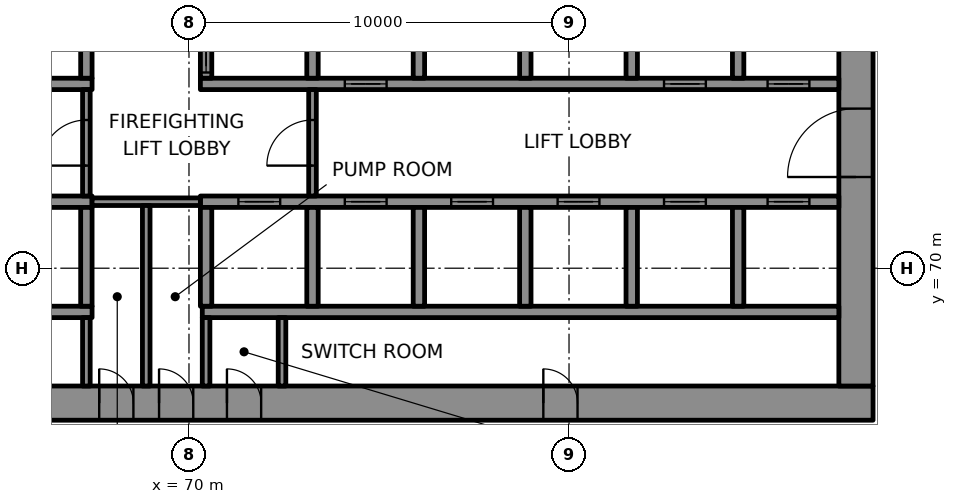
"""IFC4 building model, lengths in metres.
Left out: names, types, materials, properties, quantities, classifications, styles, units other than length and angle.
Written with IfcOpenShell. Run it as: python <this file> out.ifc"""

import sys

from ifc_helpers import new_model, si_unit, direction, frame, frame_2d, origin, place, context, subcontext, project, spatial, rectangle, extrude, element, fill, save


model = new_model("IFC4")
c1 = context("Model", 3, precision=1e-05, world=origin(), true_north=direction((0.0, 1.0)))
c2 = subcontext(c1, "Body", "Model", "MODEL_VIEW")
j1 = project(units=[si_unit("LENGTHUNIT", "METRE"), si_unit("PLANEANGLEUNIT", "RADIAN")], contexts=[c1])
p1 = place(None, origin())
s1 = spatial("IfcSite", under=j1, at=p1, CompositionType="ELEMENT")
p2 = place(p1, origin())
s2 = spatial("IfcBuilding", under=s1, at=p2, CompositionType="ELEMENT")
p3 = place(p2, frame((0.0, 0.0, 115.6)))
s3 = spatial("IfcBuildingStorey", under=s2, at=p3, CompositionType="ELEMENT", Elevation=115.6)
p4 = place(p3, frame((62.0, 66.45, 0.0), z_axis=(0.0, 0.0, 1.0), x_axis=(1.0, 0.0, 0.0)))
e1 = element("IfcWall", 1, at=p4, inside=s3, PredefinedType="SHEAR", context=c2, shape_type="SweptSolid", body=[
    extrude(rectangle(XDim=26.0, YDim=0.9, at=frame_2d((13.0, 0.0))), origin(), (0.0, 0.0, 1.0), 4.0),
])
p5 = place(p4, frame((3.45, 0.0, 0.0)))
e2 = element("IfcOpeningElement", 2, at=p5, cuts=e1, PredefinedType="OPENING", context=c2, shape_type="SweptSolid", body=[
    extrude(rectangle(XDim=0.9, YDim=2.1, at=frame_2d((0.45, 1.05))), frame((0.0, 0.46, 0.0), z_axis=(0.0, -1.0, 0.0), x_axis=(1.0, 0.0, 0.0)), (0.0, 0.0, 1.0), 0.92),
])
p6 = place(p4, frame((5.637, 0.0, 0.0)))
e3 = element("IfcOpeningElement", 3, at=p6, cuts=e1, PredefinedType="OPENING", context=c2, shape_type="SweptSolid", body=[
    extrude(rectangle(XDim=0.9, YDim=2.1, at=frame_2d((0.45, 1.05))), frame((0.0, 0.46, 0.0), z_axis=(0.0, -1.0, 0.0), x_axis=(1.0, 0.0, 0.0)), (0.0, 0.0, 1.0), 0.92),
])
p7 = place(p4, frame((7.212, 0.0, 0.0)))
e4 = element("IfcOpeningElement", 4, at=p7, cuts=e1, PredefinedType="OPENING", context=c2, shape_type="SweptSolid", body=[
    extrude(rectangle(XDim=0.9, YDim=2.1, at=frame_2d((0.45, 1.05))), frame((0.0, 0.46, 0.0), z_axis=(0.0, -1.0, 0.0), x_axis=(1.0, 0.0, 0.0)), (0.0, 0.0, 1.0), 0.92),
])
p8 = place(p4, frame((8.999, 0.0, 0.0)))
e5 = element("IfcOpeningElement", 5, at=p8, cuts=e1, PredefinedType="OPENING", context=c2, shape_type="SweptSolid", body=[
    extrude(rectangle(XDim=0.9, YDim=2.1, at=frame_2d((0.45, 1.05))), frame((0.0, 0.46, 0.0), z_axis=(0.0, -1.0, 0.0), x_axis=(1.0, 0.0, 0.0)), (0.0, 0.0, 1.0), 0.92),
])
p9 = place(p4, frame((17.324, 0.0, 0.0)))
e6 = element("IfcOpeningElement", 6, at=p9, cuts=e1, PredefinedType="OPENING", context=c2, shape_type="SweptSolid", body=[
    extrude(rectangle(XDim=0.9, YDim=2.1, at=frame_2d((0.45, 1.05))), frame((0.0, 0.46, 0.0), z_axis=(0.0, -1.0, 0.0), x_axis=(1.0, 0.0, 0.0)), (0.0, 0.0, 1.0), 0.92),
])
p10 = place(p3, frame((87.55, 66.9, 0.0), z_axis=(0.0, 0.0, 1.0), x_axis=(0.0, 1.0, 0.0)))
e7 = element("IfcWall", 7, at=p10, inside=s3, PredefinedType="SHEAR", context=c2, shape_type="SweptSolid", body=[
    extrude(rectangle(XDim=16.2, YDim=0.9, at=frame_2d((8.1, 0.0))), origin(), (0.0, 0.0, 1.0), 4.0),
])
p11 = place(p10, frame((5.5, 0.0, 0.0)))
e8 = element("IfcOpeningElement", 8, at=p11, cuts=e7, PredefinedType="OPENING", context=c2, shape_type="SweptSolid", body=[
    extrude(rectangle(XDim=1.8, YDim=2.1, at=frame_2d((0.9, 1.05))), frame((0.0, 0.46, 0.0), z_axis=(0.0, -1.0, 0.0), x_axis=(1.0, 0.0, 0.0)), (0.0, 0.0, 1.0), 0.92),
])
p12 = place(p10, frame((11.202, 0.0, 0.0)))
e9 = element("IfcOpeningElement", 9, at=p12, cuts=e7, PredefinedType="OPENING", context=c2, shape_type="SweptSolid", body=[
    extrude(rectangle(XDim=0.9, YDim=2.1, at=frame_2d((0.45, 1.05))), frame((0.0, 0.46, 0.0), z_axis=(0.0, -1.0, 0.0), x_axis=(1.0, 0.0, 0.0)), (0.0, 0.0, 1.0), 0.92),
])
p13 = place(p3, frame((64.35, 68.85, 0.0), z_axis=(0.0, 0.0, 1.0), x_axis=(1.0, 0.0, 0.0)))
e10 = element("IfcWall", 10, at=p13, inside=s3, PredefinedType="SHEAR", context=c2, shape_type="SweptSolid", body=[
    extrude(rectangle(XDim=3.1, YDim=0.3, at=frame_2d((1.55, 0.0))), origin(), (0.0, 0.0, 1.0), 4.0),
])
p14 = place(p3, frame((70.35, 68.85, 0.0), z_axis=(0.0, 0.0, 1.0), x_axis=(1.0, 0.0, 0.0)))
e11 = element("IfcWall", 11, at=p14, inside=s3, PredefinedType="SHEAR", context=c2, shape_type="SweptSolid", body=[
    extrude(rectangle(XDim=16.75, YDim=0.3, at=frame_2d((8.375, 0.0))), origin(), (0.0, 0.0, 1.0), 4.0),
])
p15 = place(p3, frame((64.35, 71.75, 0.0), z_axis=(0.0, 0.0, 1.0), x_axis=(1.0, 0.0, 0.0)))
e12 = element("IfcWall", 12, at=p15, inside=s3, PredefinedType="SHEAR", context=c2, shape_type="SweptSolid", body=[
    extrude(rectangle(XDim=3.1, YDim=0.3, at=frame_2d((1.55, 0.0))), origin(), (0.0, 0.0, 1.0), 4.0),
])
p16 = place(p3, frame((70.3, 71.75, 0.0), z_axis=(0.0, 0.0, 1.0), x_axis=(1.0, 0.0, 0.0)))
e13 = element("IfcWall", 13, at=p16, inside=s3, PredefinedType="SHEAR", context=c2, shape_type="SweptSolid", body=[
    extrude(rectangle(XDim=16.8, YDim=0.3, at=frame_2d((8.4, 0.0))), origin(), (0.0, 0.0, 1.0), 4.0),
])
p17 = place(p16, frame((1.0, 0.0, 0.0)))
e14 = element("IfcOpeningElement", 14, at=p17, cuts=e13, PredefinedType="OPENING", context=c2, shape_type="SweptSolid", body=[
    extrude(rectangle(XDim=1.1, YDim=2.1, at=frame_2d((0.55, 1.05))), frame((0.0, 0.16, 0.0), z_axis=(0.0, -1.0, 0.0), x_axis=(1.0, 0.0, 0.0)), (0.0, 0.0, 1.0), 0.32),
])
p18 = place(p16, frame((3.8, 0.0, 0.0)))
e15 = element("IfcOpeningElement", 15, at=p18, cuts=e13, PredefinedType="OPENING", context=c2, shape_type="SweptSolid", body=[
    extrude(rectangle(XDim=1.1, YDim=2.1, at=frame_2d((0.55, 1.05))), frame((0.0, 0.16, 0.0), z_axis=(0.0, -1.0, 0.0), x_axis=(1.0, 0.0, 0.0)), (0.0, 0.0, 1.0), 0.32),
])
p19 = place(p16, frame((6.6, 0.0, 0.0)))
e16 = element("IfcOpeningElement", 16, at=p19, cuts=e13, PredefinedType="OPENING", context=c2, shape_type="SweptSolid", body=[
    extrude(rectangle(XDim=1.1, YDim=2.1, at=frame_2d((0.55, 1.05))), frame((0.0, 0.16, 0.0), z_axis=(0.0, -1.0, 0.0), x_axis=(1.0, 0.0, 0.0)), (0.0, 0.0, 1.0), 0.32),
])
p20 = place(p16, frame((9.4, 0.0, 0.0)))
e17 = element("IfcOpeningElement", 17, at=p20, cuts=e13, PredefinedType="OPENING", context=c2, shape_type="SweptSolid", body=[
    extrude(rectangle(XDim=1.1, YDim=2.1, at=frame_2d((0.55, 1.05))), frame((0.0, 0.16, 0.0), z_axis=(0.0, -1.0, 0.0), x_axis=(1.0, 0.0, 0.0)), (0.0, 0.0, 1.0), 0.32),
])
p21 = place(p16, frame((12.2, 0.0, 0.0)))
e18 = element("IfcOpeningElement", 18, at=p21, cuts=e13, PredefinedType="OPENING", context=c2, shape_type="SweptSolid", body=[
    extrude(rectangle(XDim=1.1, YDim=2.1, at=frame_2d((0.55, 1.05))), frame((0.0, 0.16, 0.0), z_axis=(0.0, -1.0, 0.0), x_axis=(1.0, 0.0, 0.0)), (0.0, 0.0, 1.0), 0.32),
])
p22 = place(p16, frame((14.925, 0.0, 0.0)))
e19 = element("IfcOpeningElement", 19, at=p22, cuts=e13, PredefinedType="OPENING", context=c2, shape_type="SweptSolid", body=[
    extrude(rectangle(XDim=1.1, YDim=2.1, at=frame_2d((0.55, 1.05))), frame((0.0, 0.16, 0.0), z_axis=(0.0, -1.0, 0.0), x_axis=(1.0, 0.0, 0.0)), (0.0, 0.0, 1.0), 0.32),
])
p23 = place(p3, frame((64.35, 74.85, 0.0), z_axis=(0.0, 0.0, 1.0), x_axis=(1.0, 0.0, 0.0)))
e20 = element("IfcWall", 20, at=p23, inside=s3, PredefinedType="SHEAR", context=c2, shape_type="SweptSolid", body=[
    extrude(rectangle(XDim=3.1, YDim=0.3, at=frame_2d((1.55, 0.0))), origin(), (0.0, 0.0, 1.0), 4.0),
])
p24 = place(p3, frame((70.3, 74.85, 0.0), z_axis=(0.0, 0.0, 1.0), x_axis=(1.0, 0.0, 0.0)))
e21 = element("IfcWall", 21, at=p24, inside=s3, PredefinedType="SHEAR", context=c2, shape_type="SweptSolid", body=[
    extrude(rectangle(XDim=16.8, YDim=0.3, at=frame_2d((8.4, 0.0))), origin(), (0.0, 0.0, 1.0), 4.0),
])
p25 = place(p24, frame((3.8, 0.0, 0.0)))
e22 = element("IfcOpeningElement", 22, at=p25, cuts=e21, PredefinedType="OPENING", context=c2, shape_type="SweptSolid", body=[
    extrude(rectangle(XDim=1.1, YDim=2.1, at=frame_2d((0.55, 1.05))), frame((0.0, 0.16, 0.0), z_axis=(0.0, -1.0, 0.0), x_axis=(1.0, 0.0, 0.0)), (0.0, 0.0, 1.0), 0.32),
])
p26 = place(p24, frame((12.2, 0.0, 0.0)))
e23 = element("IfcOpeningElement", 23, at=p26, cuts=e21, PredefinedType="OPENING", context=c2, shape_type="SweptSolid", body=[
    extrude(rectangle(XDim=1.1, YDim=2.1, at=frame_2d((0.55, 1.05))), frame((0.0, 0.16, 0.0), z_axis=(0.0, -1.0, 0.0), x_axis=(1.0, 0.0, 0.0)), (0.0, 0.0, 1.0), 0.32),
])
p27 = place(p24, frame((14.925, 0.0, 0.0)))
e24 = element("IfcOpeningElement", 24, at=p27, cuts=e21, PredefinedType="OPENING", context=c2, shape_type="SweptSolid", body=[
    extrude(rectangle(XDim=1.1, YDim=2.1, at=frame_2d((0.55, 1.05))), frame((0.0, 0.16, 0.0), z_axis=(0.0, -1.0, 0.0), x_axis=(1.0, 0.0, 0.0)), (0.0, 0.0, 1.0), 0.32),
])
for number, where, z_axis, x_axis in (
    (25, (67.3, 69.0, 0.0), (0.0, 0.0, 1.0), (0.0, 1.0, 0.0)),
    (26, (67.3, 75.0, 0.0), (0.0, 0.0, 1.0), (0.0, 1.0, 0.0)),
    (27, (70.45, 69.0, 0.0), (0.0, 0.0, 1.0), (0.0, 1.0, 0.0)),
):
    element("IfcWall", number, at=place(p3, frame(where, z_axis=z_axis, x_axis=x_axis)), inside=s3, PredefinedType="SHEAR", context=c2, shape_type="SweptSolid", body=[
        extrude(rectangle(XDim=2.6, YDim=0.3, at=frame_2d((1.3, 0.0))), origin(), (0.0, 0.0, 1.0), 4.0),
    ])
p28 = place(p3, frame((70.45, 75.0, 0.0), z_axis=(0.0, 0.0, 1.0), x_axis=(0.0, 1.0, 0.0)))
e28 = element("IfcWall", 28, at=p28, inside=s3, PredefinedType="SHEAR", context=c2, shape_type="SweptSolid", body=[
    extrude(rectangle(XDim=2.6, YDim=0.3, at=frame_2d((1.3, 0.0))), origin(), (0.0, 0.0, 1.0), 4.0),
])
p29 = place(p28, frame((0.15, 0.0, 0.0)))
e29 = element("IfcOpeningElement", 29, at=p29, cuts=e28, PredefinedType="OPENING", context=c2, shape_type="SweptSolid", body=[
    extrude(rectangle(XDim=1.1, YDim=2.1, at=frame_2d((0.55, 1.05))), frame((0.0, 0.16, 0.0), z_axis=(0.0, -1.0, 0.0), x_axis=(1.0, 0.0, 0.0)), (0.0, 0.0, 1.0), 0.32),
])
for number, where, z_axis, x_axis in (
    (30, (73.25, 69.0, 0.0), (0.0, 0.0, 1.0), (0.0, 1.0, 0.0)),
    (31, (73.25, 75.0, 0.0), (0.0, 0.0, 1.0), (0.0, 1.0, 0.0)),
    (32, (76.05, 69.0, 0.0), (0.0, 0.0, 1.0), (0.0, 1.0, 0.0)),
    (33, (76.05, 75.0, 0.0), (0.0, 0.0, 1.0), (0.0, 1.0, 0.0)),
    (34, (78.85, 69.0, 0.0), (0.0, 0.0, 1.0), (0.0, 1.0, 0.0)),
    (35, (78.85, 75.0, 0.0), (0.0, 0.0, 1.0), (0.0, 1.0, 0.0)),
    (36, (81.65, 69.0, 0.0), (0.0, 0.0, 1.0), (0.0, 1.0, 0.0)),
    (37, (81.65, 75.0, 0.0), (0.0, 0.0, 1.0), (0.0, 1.0, 0.0)),
    (38, (84.45, 69.0, 0.0), (0.0, 0.0, 1.0), (0.0, 1.0, 0.0)),
    (39, (84.45, 75.0, 0.0), (0.0, 0.0, 1.0), (0.0, 1.0, 0.0)),
):
    element("IfcWall", number, at=place(p3, frame(where, z_axis=z_axis, x_axis=x_axis)), inside=s3, PredefinedType="SHEAR", context=c2, shape_type="SweptSolid", body=[
        extrude(rectangle(XDim=2.6, YDim=0.3, at=frame_2d((1.3, 0.0))), origin(), (0.0, 0.0, 1.0), 4.0),
    ])
p30 = place(p3, frame((67.45, 71.75, 0.0), z_axis=(0.0, 0.0, 1.0), x_axis=(1.0, 0.0, 0.0)))
e40 = element("IfcWall", 40, at=p30, inside=s3, PredefinedType="PARTITIONING", context=c2, shape_type="SweptSolid", body=[
    extrude(rectangle(XDim=2.85, YDim=0.2, at=frame_2d((1.425, 0.0))), origin(), (0.0, 0.0, 1.0), 4.0),
])
p31 = place(p3, frame((67.3, 66.9, 0.0), z_axis=(0.0, 0.0, 1.0), x_axis=(0.0, 1.0, 0.0)))
e41 = element("IfcWall", 41, at=p31, inside=s3, PredefinedType="PARTITIONING", context=c2, shape_type="SweptSolid", body=[
    extrude(rectangle(XDim=1.8, YDim=0.2, at=frame_2d((0.9, 0.0))), origin(), (0.0, 0.0, 1.0), 4.0),
])
p32 = place(p3, frame((67.3, 71.9, 0.0), z_axis=(0.0, 0.0, 1.0), x_axis=(0.0, 1.0, 0.0)))
e42 = element("IfcWall", 42, at=p32, inside=s3, PredefinedType="PARTITIONING", context=c2, shape_type="SweptSolid", body=[
    extrude(rectangle(XDim=2.8, YDim=0.2, at=frame_2d((1.4, 0.0))), origin(), (0.0, 0.0, 1.0), 4.0),
])
p33 = place(p32, frame((0.8, 0.0, 0.0)))
e43 = element("IfcOpeningElement", 43, at=p33, cuts=e42, PredefinedType="OPENING", context=c2, shape_type="SweptSolid", body=[
    extrude(rectangle(XDim=1.2, YDim=2.1, at=frame_2d((0.6, 1.05))), frame((0.0, 0.11, 0.0), z_axis=(0.0, -1.0, 0.0), x_axis=(1.0, 0.0, 0.0)), (0.0, 0.0, 1.0), 0.22),
])
p34 = place(p3, frame((68.875, 66.9, 0.0), z_axis=(0.0, 0.0, 1.0), x_axis=(0.0, 1.0, 0.0)))
e44 = element("IfcWall", 44, at=p34, inside=s3, PredefinedType="PARTITIONING", context=c2, shape_type="SweptSolid", body=[
    extrude(rectangle(XDim=4.75, YDim=0.2, at=frame_2d((2.375, 0.0))), origin(), (0.0, 0.0, 1.0), 4.0),
])
for number, where, z_axis, x_axis in (
    (45, (70.45, 66.9, 0.0), (0.0, 0.0, 1.0), (0.0, 1.0, 0.0)),
    (46, (72.448, 66.9, 0.0), (0.0, 0.0, 1.0), (0.0, 1.0, 0.0)),
):
    element("IfcWall", number, at=place(p3, frame(where, z_axis=z_axis, x_axis=x_axis)), inside=s3, PredefinedType="PARTITIONING", context=c2, shape_type="SweptSolid", body=[
        extrude(rectangle(XDim=1.8, YDim=0.2, at=frame_2d((0.9, 0.0))), origin(), (0.0, 0.0, 1.0), 4.0),
    ])
p35 = place(p3, frame((73.25, 71.9, 0.0), z_axis=(0.0, 0.0, 1.0), x_axis=(0.0, 1.0, 0.0)))
e47 = element("IfcWall", 47, at=p35, inside=s3, PredefinedType="PARTITIONING", context=c2, shape_type="SweptSolid", body=[
    extrude(rectangle(XDim=2.8, YDim=0.2, at=frame_2d((1.4, 0.0))), origin(), (0.0, 0.0, 1.0), 4.0),
])
p36 = place(p35, frame((0.8, 0.0, 0.0)))
e48 = element("IfcOpeningElement", 48, at=p36, cuts=e47, PredefinedType="OPENING", context=c2, shape_type="SweptSolid", body=[
    extrude(rectangle(XDim=1.2, YDim=2.1, at=frame_2d((0.6, 1.05))), frame((0.0, 0.11, 0.0), z_axis=(0.0, -1.0, 0.0), x_axis=(1.0, 0.0, 0.0)), (0.0, 0.0, 1.0), 0.22),
])
p37 = place(p17, origin())
e49 = element("IfcDoor", 49, at=p37, inside=s3, OperationType="DOUBLE_DOOR_SLIDING", PredefinedType="DOOR", context=c2, shape_type="SweptSolid", body=[
    extrude(rectangle(XDim=1.1, YDim=2.1, at=frame_2d((0.55, 1.05))), frame((0.0, 0.025, 0.0), z_axis=(0.0, -1.0, 0.0), x_axis=(1.0, 0.0, 0.0)), (0.0, 0.0, 1.0), 0.05),
])
fill(e14, e49)
p38 = place(p18, origin())
e50 = element("IfcDoor", 50, at=p38, inside=s3, OperationType="DOUBLE_DOOR_SLIDING", PredefinedType="DOOR", context=c2, shape_type="SweptSolid", body=[
    extrude(rectangle(XDim=1.1, YDim=2.1, at=frame_2d((0.55, 1.05))), frame((0.0, 0.025, 0.0), z_axis=(0.0, -1.0, 0.0), x_axis=(1.0, 0.0, 0.0)), (0.0, 0.0, 1.0), 0.05),
])
fill(e15, e50)
p39 = place(p19, origin())
e51 = element("IfcDoor", 51, at=p39, inside=s3, OperationType="DOUBLE_DOOR_SLIDING", PredefinedType="DOOR", context=c2, shape_type="SweptSolid", body=[
    extrude(rectangle(XDim=1.1, YDim=2.1, at=frame_2d((0.55, 1.05))), frame((0.0, 0.025, 0.0), z_axis=(0.0, -1.0, 0.0), x_axis=(1.0, 0.0, 0.0)), (0.0, 0.0, 1.0), 0.05),
])
fill(e16, e51)
p40 = place(p20, origin())
e52 = element("IfcDoor", 52, at=p40, inside=s3, OperationType="DOUBLE_DOOR_SLIDING", PredefinedType="DOOR", context=c2, shape_type="SweptSolid", body=[
    extrude(rectangle(XDim=1.1, YDim=2.1, at=frame_2d((0.55, 1.05))), frame((0.0, 0.025, 0.0), z_axis=(0.0, -1.0, 0.0), x_axis=(1.0, 0.0, 0.0)), (0.0, 0.0, 1.0), 0.05),
])
fill(e17, e52)
p41 = place(p21, origin())
e53 = element("IfcDoor", 53, at=p41, inside=s3, OperationType="DOUBLE_DOOR_SLIDING", PredefinedType="DOOR", context=c2, shape_type="SweptSolid", body=[
    extrude(rectangle(XDim=1.1, YDim=2.1, at=frame_2d((0.55, 1.05))), frame((0.0, 0.025, 0.0), z_axis=(0.0, -1.0, 0.0), x_axis=(1.0, 0.0, 0.0)), (0.0, 0.0, 1.0), 0.05),
])
fill(e18, e53)
p42 = place(p22, origin())
e54 = element("IfcDoor", 54, at=p42, inside=s3, OperationType="DOUBLE_DOOR_SLIDING", PredefinedType="DOOR", context=c2, shape_type="SweptSolid", body=[
    extrude(rectangle(XDim=1.1, YDim=2.1, at=frame_2d((0.55, 1.05))), frame((0.0, 0.025, 0.0), z_axis=(0.0, -1.0, 0.0), x_axis=(1.0, 0.0, 0.0)), (0.0, 0.0, 1.0), 0.05),
])
fill(e19, e54)
p43 = place(p29, origin())
e55 = element("IfcDoor", 55, at=p43, inside=s3, OperationType="DOUBLE_DOOR_SLIDING", PredefinedType="DOOR", context=c2, shape_type="SweptSolid", body=[
    extrude(rectangle(XDim=1.1, YDim=2.1, at=frame_2d((0.55, 1.05))), frame((0.0, 0.025, 0.0), z_axis=(0.0, -1.0, 0.0), x_axis=(1.0, 0.0, 0.0)), (0.0, 0.0, 1.0), 0.05),
])
fill(e29, e55)
p44 = place(p25, origin())
e56 = element("IfcDoor", 56, at=p44, inside=s3, OperationType="DOUBLE_DOOR_SLIDING", PredefinedType="DOOR", context=c2, shape_type="SweptSolid", body=[
    extrude(rectangle(XDim=1.1, YDim=2.1, at=frame_2d((0.55, 1.05))), frame((0.0, 0.025, 0.0), z_axis=(0.0, -1.0, 0.0), x_axis=(1.0, 0.0, 0.0)), (0.0, 0.0, 1.0), 0.05),
])
fill(e22, e56)
p45 = place(p26, origin())
e57 = element("IfcDoor", 57, at=p45, inside=s3, OperationType="DOUBLE_DOOR_SLIDING", PredefinedType="DOOR", context=c2, shape_type="SweptSolid", body=[
    extrude(rectangle(XDim=1.1, YDim=2.1, at=frame_2d((0.55, 1.05))), frame((0.0, 0.025, 0.0), z_axis=(0.0, -1.0, 0.0), x_axis=(1.0, 0.0, 0.0)), (0.0, 0.0, 1.0), 0.05),
])
fill(e23, e57)
p46 = place(p27, origin())
e58 = element("IfcDoor", 58, at=p46, inside=s3, OperationType="DOUBLE_DOOR_SLIDING", PredefinedType="DOOR", context=c2, shape_type="SweptSolid", body=[
    extrude(rectangle(XDim=1.1, YDim=2.1, at=frame_2d((0.55, 1.05))), frame((0.0, 0.025, 0.0), z_axis=(0.0, -1.0, 0.0), x_axis=(1.0, 0.0, 0.0)), (0.0, 0.0, 1.0), 0.05),
])
fill(e24, e58)
p47 = place(p36, origin())
e59 = element("IfcDoor", 59, at=p47, inside=s3, OperationType="SINGLE_SWING_LEFT", PredefinedType="DOOR", context=c2, shape_type="SweptSolid", body=[
    extrude(rectangle(XDim=1.2, YDim=2.1, at=frame_2d((0.6, 1.05))), frame((0.0, 0.025, 0.0), z_axis=(0.0, -1.0, 0.0), x_axis=(1.0, 0.0, 0.0)), (0.0, 0.0, 1.0), 0.05),
])
fill(e48, e59)
p48 = place(p33, origin())
e60 = element("IfcDoor", 60, at=p48, inside=s3, OperationType="SINGLE_SWING_RIGHT", PredefinedType="DOOR", context=c2, shape_type="SweptSolid", body=[
    extrude(rectangle(XDim=1.2, YDim=2.1, at=frame_2d((0.6, 1.05))), frame((0.0, 0.025, 0.0), z_axis=(0.0, -1.0, 0.0), x_axis=(1.0, 0.0, 0.0)), (0.0, 0.0, 1.0), 0.05),
])
fill(e43, e60)
p49 = place(p11, origin())
e61 = element("IfcDoor", 61, at=p49, inside=s3, OperationType="SINGLE_SWING_RIGHT", PredefinedType="DOOR", context=c2, shape_type="SweptSolid", body=[
    extrude(rectangle(XDim=1.8, YDim=2.1, at=frame_2d((0.9, 1.05))), frame((0.0, 0.17, 0.0), z_axis=(0.0, -1.0, 0.0), x_axis=(1.0, 0.0, 0.0)), (0.0, 0.0, 1.0), 0.34),
])
fill(e8, e61)
p50 = place(p6, origin())
e62 = element("IfcDoor", 62, at=p50, inside=s3, OperationType="SINGLE_SWING_RIGHT", PredefinedType="DOOR", context=c2, shape_type="SweptSolid", body=[
    extrude(rectangle(XDim=0.9, YDim=2.1, at=frame_2d((0.45, 1.05))), frame((0.0, 0.17, 0.0), z_axis=(0.0, -1.0, 0.0), x_axis=(1.0, 0.0, 0.0)), (0.0, 0.0, 1.0), 0.34),
])
fill(e3, e62)
p51 = place(p7, origin())
e63 = element("IfcDoor", 63, at=p51, inside=s3, OperationType="SINGLE_SWING_LEFT", PredefinedType="DOOR", context=c2, shape_type="SweptSolid", body=[
    extrude(rectangle(XDim=0.9, YDim=2.1, at=frame_2d((0.45, 1.05))), frame((0.0, 0.17, 0.0), z_axis=(0.0, -1.0, 0.0), x_axis=(1.0, 0.0, 0.0)), (0.0, 0.0, 1.0), 0.34),
])
fill(e4, e63)
p52 = place(p8, origin())
e64 = element("IfcDoor", 64, at=p52, inside=s3, OperationType="SINGLE_SWING_RIGHT", PredefinedType="DOOR", context=c2, shape_type="SweptSolid", body=[
    extrude(rectangle(XDim=0.9, YDim=2.1, at=frame_2d((0.45, 1.05))), frame((0.0, 0.17, 0.0), z_axis=(0.0, -1.0, 0.0), x_axis=(1.0, 0.0, 0.0)), (0.0, 0.0, 1.0), 0.34),
])
fill(e5, e64)
p53 = place(p9, origin())
e65 = element("IfcDoor", 65, at=p53, inside=s3, OperationType="SINGLE_SWING_LEFT", PredefinedType="DOOR", context=c2, shape_type="SweptSolid", body=[
    extrude(rectangle(XDim=0.9, YDim=2.1, at=frame_2d((0.45, 1.05))), frame((0.0, 0.17, 0.0), z_axis=(0.0, -1.0, 0.0), x_axis=(1.0, 0.0, 0.0)), (0.0, 0.0, 1.0), 0.34),
])
fill(e6, e65)
save(model, sys.argv[1])
